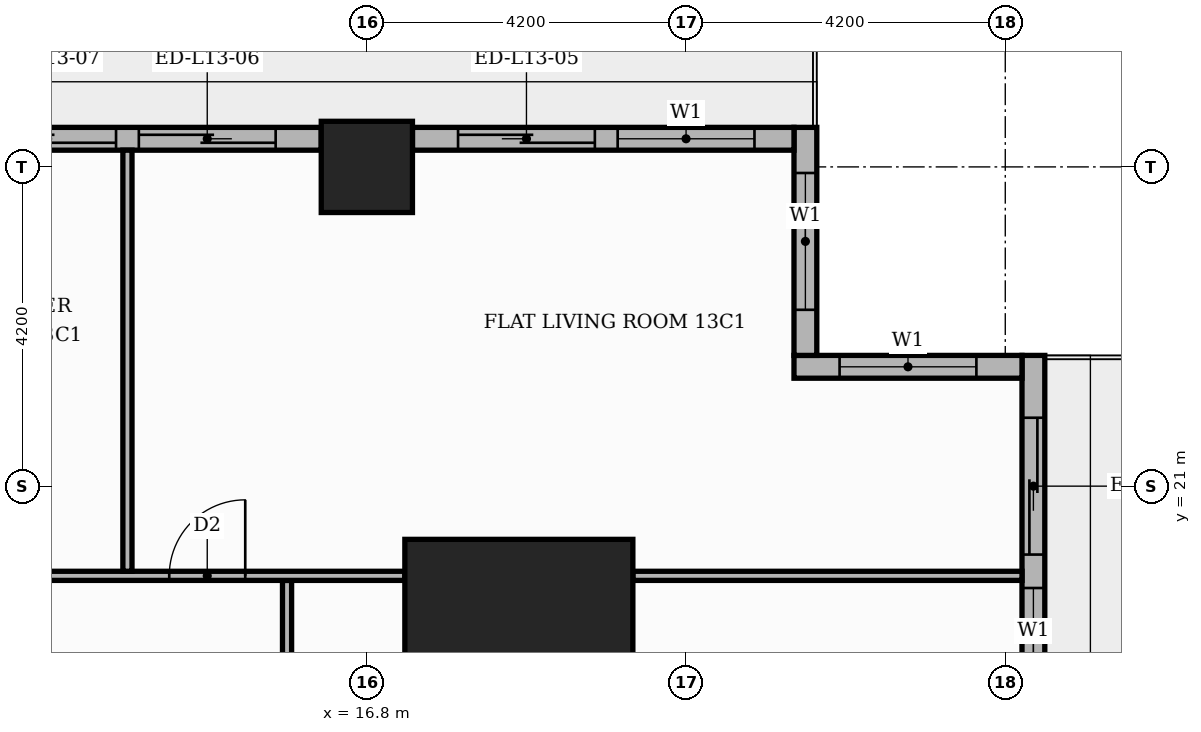
"""IFC4 building model, lengths in metres.
Left out: names, types, materials, properties, quantities, classifications, styles, units other than length and angle.
Written with IfcOpenShell. Run it as: python <this file> out.ifc"""

import sys

from ifc_helpers import new_model, si_unit, direction, frame, frame_2d, origin, origin_2d, place, context, subcontext, project, spatial, rectangle, extrude, element, fill, save


model = new_model("IFC4")
c1 = context("Model", 3, precision=1e-05, world=origin(), true_north=direction((0.0, 1.0)))
c2 = subcontext(c1, "Body", "Model", "MODEL_VIEW")
j1 = project(units=[si_unit("LENGTHUNIT", "METRE"), si_unit("PLANEANGLEUNIT", "RADIAN")], contexts=[c1])
p1 = place(None, origin())
s1 = spatial("IfcSite", under=j1, at=p1, CompositionType="ELEMENT")
p2 = place(p1, origin())
s2 = spatial("IfcBuilding", under=s1, at=p2, CompositionType="ELEMENT")
p3 = place(p2, frame((0.0, 0.0, 58.2)))
s3 = spatial("IfcBuildingStorey", under=s2, at=p3, CompositionType="ELEMENT", Elevation=58.2)
p4 = place(p3, frame((18.8, 18.8, 0.0), z_axis=(0.0, 0.0, 1.0), x_axis=(1.0, 0.0, 0.0)))
e1 = element("IfcColumn", 1, at=p4, inside=s3, PredefinedType="COLUMN", context=c2, shape_type="SweptSolid", body=[
    extrude(rectangle(XDim=3.0, YDim=3.0, at=origin_2d()), origin(), (0.0, 0.0, 1.0), 3.9),
])
p5 = place(p3, frame((16.8, 25.2, 0.0), z_axis=(0.0, 0.0, 1.0), x_axis=(1.0, 0.0, 0.0)))
e2 = element("IfcColumn", 2, at=p5, inside=s3, PredefinedType="COLUMN", context=c2, shape_type="SweptSolid", body=[
    extrude(rectangle(XDim=1.2, YDim=1.2, at=origin_2d()), origin(), (0.0, 0.0, 1.0), 3.9),
])
p6 = place(p3, frame((25.57, 17.4, 0.0), z_axis=(0.0, 0.0, 1.0), x_axis=(0.0, 1.0, 0.0)))
e3 = element("IfcWall", 3, at=p6, inside=s3, PredefinedType="STANDARD", context=c2, shape_type="SweptSolid", body=[
    extrude(rectangle(XDim=5.32, YDim=0.3, at=frame_2d((2.66, 0.0))), origin(), (0.0, 0.0, 1.0), 3.48),
])
p7 = place(p6, frame((2.7, 0.0, 0.0)))
e4 = element("IfcOpeningElement", 4, at=p7, cuts=e3, PredefinedType="OPENING", context=c2, shape_type="SweptSolid", body=[
    extrude(rectangle(XDim=1.8, YDim=2.4, at=frame_2d((0.9, 1.2))), frame((0.0, 0.16, 0.0), z_axis=(0.0, -1.0, 0.0), x_axis=(1.0, 0.0, 0.0)), (0.0, 0.0, 1.0), 0.32),
])
p8 = place(p6, frame((0.46, 0.0, 0.9)))
e5 = element("IfcOpeningElement", 5, at=p8, cuts=e3, PredefinedType="OPENING", context=c2, shape_type="SweptSolid", body=[
    extrude(rectangle(XDim=1.8, YDim=2.1, at=frame_2d((0.9, 1.05))), frame((0.0, 0.16, 0.0), z_axis=(0.0, -1.0, 0.0), x_axis=(1.0, 0.0, 0.0)), (0.0, 0.0, 1.0), 0.32),
])
p9 = place(p3, frame((25.42, 22.57, 0.0), z_axis=(0.0, 0.0, 1.0), x_axis=(-1.0, 0.0, 0.0)))
e6 = element("IfcWall", 6, at=p9, inside=s3, PredefinedType="STANDARD", context=c2, shape_type="SweptSolid", body=[
    extrude(rectangle(XDim=3.0, YDim=0.3, at=frame_2d((1.5, 0.0))), origin(), (0.0, 0.0, 1.0), 3.48),
])
p10 = place(p9, frame((0.6, 0.0, 0.9)))
e7 = element("IfcOpeningElement", 7, at=p10, cuts=e6, PredefinedType="OPENING", context=c2, shape_type="SweptSolid", body=[
    extrude(rectangle(XDim=1.8, YDim=2.1, at=frame_2d((0.9, 1.05))), frame((0.0, 0.16, 0.0), z_axis=(0.0, -1.0, 0.0), x_axis=(1.0, 0.0, 0.0)), (0.0, 0.0, 1.0), 0.32),
])
p11 = place(p3, frame((22.57, 22.72, 0.0), z_axis=(0.0, 0.0, 1.0), x_axis=(0.0, 1.0, 0.0)))
e8 = element("IfcWall", 8, at=p11, inside=s3, PredefinedType="STANDARD", context=c2, shape_type="SweptSolid", body=[
    extrude(rectangle(XDim=3.0, YDim=0.3, at=frame_2d((1.5, 0.0))), origin(), (0.0, 0.0, 1.0), 3.48),
])
p12 = place(p11, frame((0.6, 0.0, 0.9)))
e9 = element("IfcOpeningElement", 9, at=p12, cuts=e8, PredefinedType="OPENING", context=c2, shape_type="SweptSolid", body=[
    extrude(rectangle(XDim=1.8, YDim=2.1, at=frame_2d((0.9, 1.05))), frame((0.0, 0.16, 0.0), z_axis=(0.0, -1.0, 0.0), x_axis=(1.0, 0.0, 0.0)), (0.0, 0.0, 1.0), 0.32),
])
p13 = place(p3, frame((22.42, 25.57, 0.0), z_axis=(0.0, 0.0, 1.0), x_axis=(-1.0, 0.0, 0.0)))
e10 = element("IfcWall", 10, at=p13, inside=s3, PredefinedType="STANDARD", context=c2, shape_type="SweptSolid", body=[
    extrude(rectangle(XDim=5.02, YDim=0.3, at=frame_2d((2.51, 0.0))), origin(), (0.0, 0.0, 1.0), 3.48),
])
p14 = place(p13, frame((0.52, 0.0, 0.9)))
e11 = element("IfcOpeningElement", 11, at=p14, cuts=e10, PredefinedType="OPENING", context=c2, shape_type="SweptSolid", body=[
    extrude(rectangle(XDim=1.8, YDim=2.1, at=frame_2d((0.9, 1.05))), frame((0.0, 0.16, 0.0), z_axis=(0.0, -1.0, 0.0), x_axis=(1.0, 0.0, 0.0)), (0.0, 0.0, 1.0), 0.32),
])
p15 = place(p13, frame((2.62, 0.0, 0.0)))
e12 = element("IfcOpeningElement", 12, at=p15, cuts=e10, PredefinedType="OPENING", context=c2, shape_type="SweptSolid", body=[
    extrude(rectangle(XDim=1.8, YDim=2.4, at=frame_2d((0.9, 1.2))), frame((0.0, 0.16, 0.0), z_axis=(0.0, -1.0, 0.0), x_axis=(1.0, 0.0, 0.0)), (0.0, 0.0, 1.0), 0.32),
])
p16 = place(p3, frame((16.2, 25.57, 0.0), z_axis=(0.0, 0.0, 1.0), x_axis=(-1.0, 0.0, 0.0)))
e13 = element("IfcWall", 13, at=p16, inside=s3, PredefinedType="STANDARD", context=c2, shape_type="SweptSolid", body=[
    extrude(rectangle(XDim=7.2, YDim=0.3, at=frame_2d((3.6, 0.0))), origin(), (0.0, 0.0, 1.0), 3.48),
])
p17 = place(p16, frame((0.6, 0.0, 0.0)))
e14 = element("IfcOpeningElement", 14, at=p17, cuts=e13, PredefinedType="OPENING", context=c2, shape_type="SweptSolid", body=[
    extrude(rectangle(XDim=1.8, YDim=2.4, at=frame_2d((0.9, 1.2))), frame((0.0, 0.16, 0.0), z_axis=(0.0, -1.0, 0.0), x_axis=(1.0, 0.0, 0.0)), (0.0, 0.0, 1.0), 0.32),
])
p18 = place(p16, frame((2.7, 0.0, 0.0)))
e15 = element("IfcOpeningElement", 15, at=p18, cuts=e13, PredefinedType="OPENING", context=c2, shape_type="SweptSolid", body=[
    extrude(rectangle(XDim=1.8, YDim=2.4, at=frame_2d((0.9, 1.2))), frame((0.0, 0.16, 0.0), z_axis=(0.0, -1.0, 0.0), x_axis=(1.0, 0.0, 0.0)), (0.0, 0.0, 1.0), 0.32),
])
p19 = place(p16, frame((4.8, 0.0, 0.9)))
e16 = element("IfcOpeningElement", 16, at=p19, cuts=e13, PredefinedType="OPENING", context=c2, shape_type="SweptSolid", body=[
    extrude(rectangle(XDim=1.8, YDim=2.1, at=frame_2d((0.9, 1.05))), frame((0.0, 0.16, 0.0), z_axis=(0.0, -1.0, 0.0), x_axis=(1.0, 0.0, 0.0)), (0.0, 0.0, 1.0), 0.32),
])
p20 = place(p3, frame((15.75, 13.75, 0.0), z_axis=(0.0, 0.0, 1.0), x_axis=(0.0, 1.0, 0.0)))
e17 = element("IfcWall", 17, at=p20, inside=s3, PredefinedType="PARTITIONING", context=c2, shape_type="SweptSolid", body=[
    extrude(rectangle(XDim=6.01, YDim=0.12, at=frame_2d((3.005, 0.0))), origin(), (0.0, 0.0, 1.0), 3.48),
])
p21 = place(p20, frame((2.485, 0.0, 0.0)))
e18 = element("IfcOpeningElement", 18, at=p21, cuts=e17, PredefinedType="OPENING", context=c2, shape_type="SweptSolid", body=[
    extrude(rectangle(XDim=1.0, YDim=2.1, at=frame_2d((0.5, 1.05))), frame((0.0, 0.07, 0.0), z_axis=(0.0, -1.0, 0.0), x_axis=(1.0, 0.0, 0.0)), (0.0, 0.0, 1.0), 0.14),
])
p22 = place(p3, frame((5.35, 19.82, 0.0), z_axis=(0.0, 0.0, 1.0), x_axis=(1.0, 0.0, 0.0)))
e19 = element("IfcWall", 19, at=p22, inside=s3, PredefinedType="PARTITIONING", context=c2, shape_type="SweptSolid", body=[
    extrude(rectangle(XDim=11.95, YDim=0.12, at=frame_2d((5.975, 0.0))), origin(), (0.0, 0.0, 1.0), 3.48),
])
p23 = place(p22, frame((8.85, 0.0, 0.0)))
e20 = element("IfcOpeningElement", 20, at=p23, cuts=e19, PredefinedType="OPENING", context=c2, shape_type="SweptSolid", body=[
    extrude(rectangle(XDim=1.0, YDim=2.1, at=frame_2d((0.5, 1.05))), frame((0.0, 0.07, 0.0), z_axis=(0.0, -1.0, 0.0), x_axis=(1.0, 0.0, 0.0)), (0.0, 0.0, 1.0), 0.14),
])
p24 = place(p22, frame((5.75, 0.0, 0.0)))
e21 = element("IfcOpeningElement", 21, at=p24, cuts=e19, PredefinedType="OPENING", context=c2, shape_type="SweptSolid", body=[
    extrude(rectangle(XDim=0.9, YDim=2.1, at=frame_2d((0.45, 1.05))), frame((0.0, 0.07, 0.0), z_axis=(0.0, -1.0, 0.0), x_axis=(1.0, 0.0, 0.0)), (0.0, 0.0, 1.0), 0.14),
])
p25 = place(p3, frame((20.3, 19.82, 0.0), z_axis=(0.0, 0.0, 1.0), x_axis=(1.0, 0.0, 0.0)))
e22 = element("IfcWall", 22, at=p25, inside=s3, PredefinedType="PARTITIONING", context=c2, shape_type="SweptSolid", body=[
    extrude(rectangle(XDim=5.12, YDim=0.12, at=frame_2d((2.56, 0.0))), origin(), (0.0, 0.0, 1.0), 3.48),
])
p26 = place(p3, frame((13.65, 19.88, 0.0), z_axis=(0.0, 0.0, 1.0), x_axis=(0.0, 1.0, 0.0)))
e23 = element("IfcWall", 23, at=p26, inside=s3, PredefinedType="PARTITIONING", context=c2, shape_type="SweptSolid", body=[
    extrude(rectangle(XDim=5.54, YDim=0.12, at=frame_2d((2.77, 0.0))), origin(), (0.0, 0.0, 1.0), 3.48),
])
p27 = place(p7, origin())
e24 = element("IfcDoor", 24, at=p27, inside=s3, OperationType="SLIDING_TO_LEFT", PredefinedType="DOOR", context=c2, shape_type="SweptSolid", body=[
    extrude(rectangle(XDim=1.8, YDim=2.4, at=frame_2d((0.9, 1.2))), frame((0.0, 0.025, 0.0), z_axis=(0.0, -1.0, 0.0), x_axis=(1.0, 0.0, 0.0)), (0.0, 0.0, 1.0), 0.05),
])
fill(e4, e24)
p28 = place(p8, origin())
e25 = element("IfcWindow", 25, at=p28, inside=s3, PartitioningType="SINGLE_PANEL", PredefinedType="WINDOW", context=c2, shape_type="SweptSolid", body=[
    extrude(rectangle(XDim=1.8, YDim=2.1, at=frame_2d((0.9, 1.05))), frame((0.0, 0.03, 0.0), z_axis=(0.0, -1.0, 0.0), x_axis=(1.0, 0.0, 0.0)), (0.0, 0.0, 1.0), 0.06),
])
fill(e5, e25)
p29 = place(p10, origin())
e26 = element("IfcWindow", 26, at=p29, inside=s3, PartitioningType="SINGLE_PANEL", PredefinedType="WINDOW", context=c2, shape_type="SweptSolid", body=[
    extrude(rectangle(XDim=1.8, YDim=2.1, at=frame_2d((0.9, 1.05))), frame((0.0, 0.03, 0.0), z_axis=(0.0, -1.0, 0.0), x_axis=(1.0, 0.0, 0.0)), (0.0, 0.0, 1.0), 0.06),
])
fill(e7, e26)
p30 = place(p12, origin())
e27 = element("IfcWindow", 27, at=p30, inside=s3, PartitioningType="SINGLE_PANEL", PredefinedType="WINDOW", context=c2, shape_type="SweptSolid", body=[
    extrude(rectangle(XDim=1.8, YDim=2.1, at=frame_2d((0.9, 1.05))), frame((0.0, 0.03, 0.0), z_axis=(0.0, -1.0, 0.0), x_axis=(1.0, 0.0, 0.0)), (0.0, 0.0, 1.0), 0.06),
])
fill(e9, e27)
p31 = place(p14, origin())
e28 = element("IfcWindow", 28, at=p31, inside=s3, PartitioningType="SINGLE_PANEL", PredefinedType="WINDOW", context=c2, shape_type="SweptSolid", body=[
    extrude(rectangle(XDim=1.8, YDim=2.1, at=frame_2d((0.9, 1.05))), frame((0.0, 0.03, 0.0), z_axis=(0.0, -1.0, 0.0), x_axis=(1.0, 0.0, 0.0)), (0.0, 0.0, 1.0), 0.06),
])
fill(e11, e28)
p32 = place(p15, origin())
e29 = element("IfcDoor", 29, at=p32, inside=s3, OperationType="SLIDING_TO_RIGHT", PredefinedType="DOOR", context=c2, shape_type="SweptSolid", body=[
    extrude(rectangle(XDim=1.8, YDim=2.4, at=frame_2d((0.9, 1.2))), frame((0.0, 0.025, 0.0), z_axis=(0.0, -1.0, 0.0), x_axis=(1.0, 0.0, 0.0)), (0.0, 0.0, 1.0), 0.05),
])
fill(e12, e29)
p33 = place(p17, origin())
e30 = element("IfcDoor", 30, at=p33, inside=s3, OperationType="SLIDING_TO_LEFT", PredefinedType="DOOR", context=c2, shape_type="SweptSolid", body=[
    extrude(rectangle(XDim=1.8, YDim=2.4, at=frame_2d((0.9, 1.2))), frame((0.0, 0.025, 0.0), z_axis=(0.0, -1.0, 0.0), x_axis=(1.0, 0.0, 0.0)), (0.0, 0.0, 1.0), 0.05),
])
fill(e14, e30)
p34 = place(p18, origin())
e31 = element("IfcDoor", 31, at=p34, inside=s3, OperationType="SLIDING_TO_RIGHT", PredefinedType="DOOR", context=c2, shape_type="SweptSolid", body=[
    extrude(rectangle(XDim=1.8, YDim=2.4, at=frame_2d((0.9, 1.2))), frame((0.0, 0.025, 0.0), z_axis=(0.0, -1.0, 0.0), x_axis=(1.0, 0.0, 0.0)), (0.0, 0.0, 1.0), 0.05),
])
fill(e15, e31)
p35 = place(p23, origin())
e32 = element("IfcDoor", 32, at=p35, inside=s3, OperationType="SINGLE_SWING_RIGHT", PredefinedType="DOOR", context=c2, shape_type="SweptSolid", body=[
    extrude(rectangle(XDim=1.0, YDim=2.1, at=frame_2d((0.5, 1.05))), frame((0.0, 0.025, 0.0), z_axis=(0.0, -1.0, 0.0), x_axis=(1.0, 0.0, 0.0)), (0.0, 0.0, 1.0), 0.05),
])
fill(e20, e32)
save(model, sys.argv[1])
